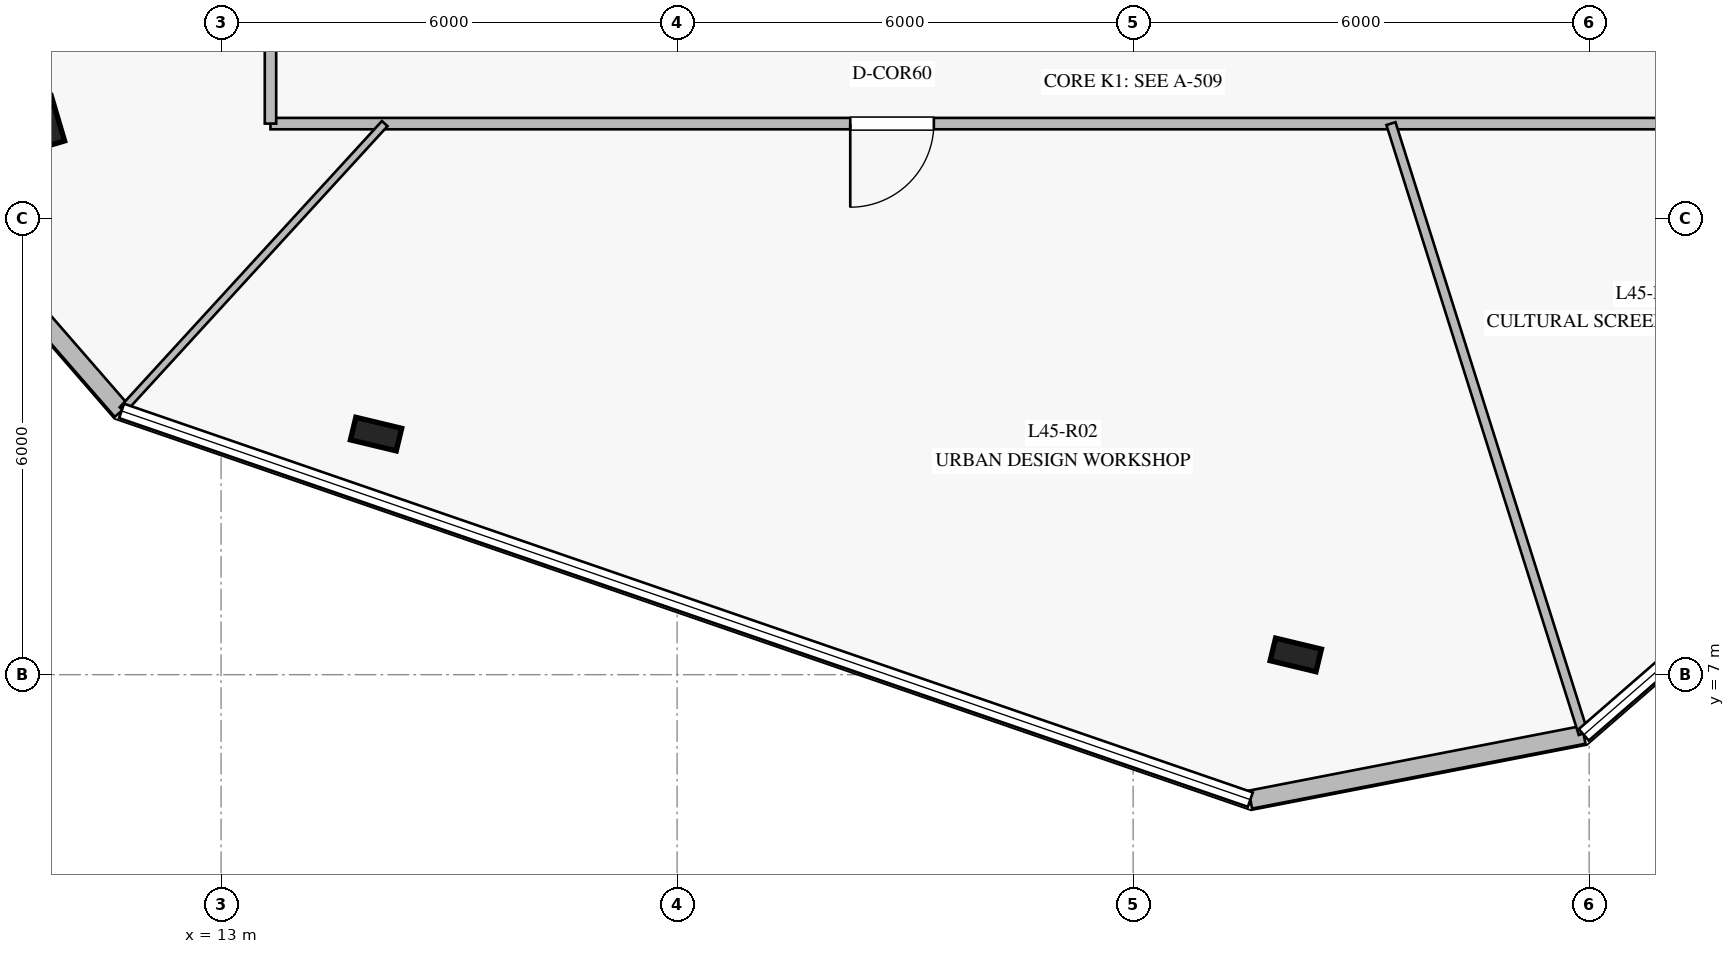
"""IFC4 building model, lengths in metres.
Left out: names, types, materials, properties, quantities, classifications, styles, units other than length and angle.
Written with IfcOpenShell. Run it as: python <this file> out.ifc"""

import sys

from ifc_helpers import new_model, si_unit, direction, frame, frame_2d, origin, origin_2d, place, context, subcontext, project, spatial, rectangle, i_section, extrude, element, fill, save


model = new_model("IFC4")
c1 = context("Model", 3, precision=1e-05, world=origin(), true_north=direction((0.0, 1.0)))
c2 = subcontext(c1, "Body", "Model", "MODEL_VIEW")
j1 = project(units=[si_unit("LENGTHUNIT", "METRE"), si_unit("PLANEANGLEUNIT", "RADIAN")], contexts=[c1])
p1 = place(None, origin())
s1 = spatial("IfcSite", under=j1, at=p1, CompositionType="ELEMENT")
p2 = place(p1, origin())
s2 = spatial("IfcBuilding", under=s1, at=p2, CompositionType="ELEMENT")
p3 = place(p2, frame((0.0, 0.0, 188.8)))
s3 = spatial("IfcBuildingStorey", under=s2, at=p3, CompositionType="ELEMENT", Elevation=188.8)
for number, where, z_axis, x_axis in (
    (1, (10.707, 14.276, 0.0), (0.0, 0.0, 1.0), (-0.284, 0.959, 0.0)),
    (2, (15.039, 10.165, 0.0), (0.0, 0.0, 1.0), (-0.972, 0.233, 0.0)),
    (3, (27.14, 7.26, 0.0), (0.0, 0.0, 1.0), (-0.972, 0.233, 0.0)),
):
    element("IfcColumn", number, at=place(p3, frame(where, z_axis=z_axis, x_axis=x_axis)), inside=s3, PredefinedType="COLUMN", context=c2, shape_type="SweptSolid", body=[
        extrude(i_section(OverallWidth=0.305, OverallDepth=0.62, WebThickness=0.021, FlangeThickness=0.04, at=origin_2d()), origin(), (0.0, 0.0, 1.0), 4.0),
    ])
p4 = place(p3, frame((8.759, 13.842, 0.0), z_axis=(0.0, 0.0, 1.0), x_axis=(0.656134075049, -0.754644337128, 0.0)))
e4 = element("IfcWall", 4, at=p4, inside=s3, PredefinedType="STANDARD", context=c2, shape_type="SweptSolid", body=[
    extrude(rectangle(XDim=4.469, YDim=0.24, at=frame_2d((2.234, 0.0))), origin(), (0.0, 0.0, 1.0), 3.78),
])
p5 = place(p3, frame((26.542, 5.356, 0.0), z_axis=(0.0, 0.0, 1.0), x_axis=(0.981615105357, 0.190871121271, 0.0)))
e5 = element("IfcWall", 5, at=p5, inside=s3, PredefinedType="STANDARD", context=c2, shape_type="SweptSolid", body=[
    extrude(rectangle(XDim=4.469, YDim=0.24, at=frame_2d((2.235, 0.0))), origin(), (0.0, 0.0, 1.0), 3.78),
])
p6 = place(p3, frame((36.35, 14.25, 0.0), z_axis=(0.0, 0.0, 1.0), x_axis=(-1.0, 0.0, 0.0)))
e6 = element("IfcWall", 6, at=p6, inside=s3, PredefinedType="PARTITIONING", context=c2, shape_type="SweptSolid", body=[
    extrude(rectangle(XDim=22.7, YDim=0.15, at=frame_2d((11.35, 0.0))), origin(), (0.0, 0.0, 1.0), 3.02),
])
p7 = place(p6, frame((13.972, 0.0, 0.0)))
e7 = element("IfcOpeningElement", 7, at=p7, cuts=e6, PredefinedType="OPENING", context=c2, shape_type="SweptSolid", body=[
    extrude(rectangle(XDim=1.1, YDim=2.2, at=frame_2d((0.55, 1.1))), frame((0.0, 0.085, 0.0), z_axis=(0.0, -1.0, 0.0), x_axis=(1.0, 0.0, 0.0)), (0.0, 0.0, 1.0), 0.17),
])
p8 = place(p3, frame((13.65, 14.25, 0.0), z_axis=(0.0, 0.0, 1.0), x_axis=(0.0, 1.0, 0.0)))
e8 = element("IfcWall", 8, at=p8, inside=s3, PredefinedType="PARTITIONING", context=c2, shape_type="SweptSolid", body=[
    extrude(rectangle(XDim=21.5, YDim=0.15, at=frame_2d((10.75, 0.0))), origin(), (0.0, 0.0, 1.0), 3.28),
])
p9 = place(p8, frame((5.134, 0.0, 0.0)))
e9 = element("IfcOpeningElement", 9, at=p9, cuts=e8, PredefinedType="OPENING", context=c2, shape_type="SweptSolid", body=[
    extrude(rectangle(XDim=1.1, YDim=2.2, at=frame_2d((0.55, 1.1))), frame((0.0, 0.085, 0.0), z_axis=(0.0, -1.0, 0.0), x_axis=(1.0, 0.0, 0.0)), (0.0, 0.0, 1.0), 0.17),
])
p10 = place(p3, frame((15.153, 14.25, 0.0), z_axis=(0.0, 0.0, 1.0), x_axis=(-0.675503818213, -0.737356488803, 0.0)))
e10 = element("IfcWall", 10, at=p10, inside=s3, PredefinedType="MOVABLE", context=c2, shape_type="SweptSolid", body=[
    extrude(rectangle(XDim=5.108, YDim=0.1, at=frame_2d((2.554, 0.0))), origin(), (0.0, 0.0, 1.0), 3.18),
])
p11 = place(p3, frame((28.392, 14.25, 0.0), z_axis=(0.0, 0.0, 1.0), x_axis=(0.300821664348, -0.953680410965, 0.0)))
e11 = element("IfcWall", 11, at=p11, inside=s3, PredefinedType="PARTITIONING", context=c2, shape_type="SweptSolid", body=[
    extrude(rectangle(XDim=8.414, YDim=0.125, at=frame_2d((4.207, 0.0))), origin(), (0.0, 0.0, 1.0), 3.05),
])
p12 = place(p7, origin())
e12 = element("IfcDoor", 12, at=p12, inside=s3, OperationType="SINGLE_SWING_RIGHT", PredefinedType="DOOR", context=c2, shape_type="SweptSolid", body=[
    extrude(rectangle(XDim=1.1, YDim=2.2, at=frame_2d((0.55, 1.1))), frame((0.0, 0.025, 0.0), z_axis=(0.0, -1.0, 0.0), x_axis=(1.0, 0.0, 0.0)), (0.0, 0.0, 1.0), 0.05),
])
fill(e7, e12)
save(model, sys.argv[1])
